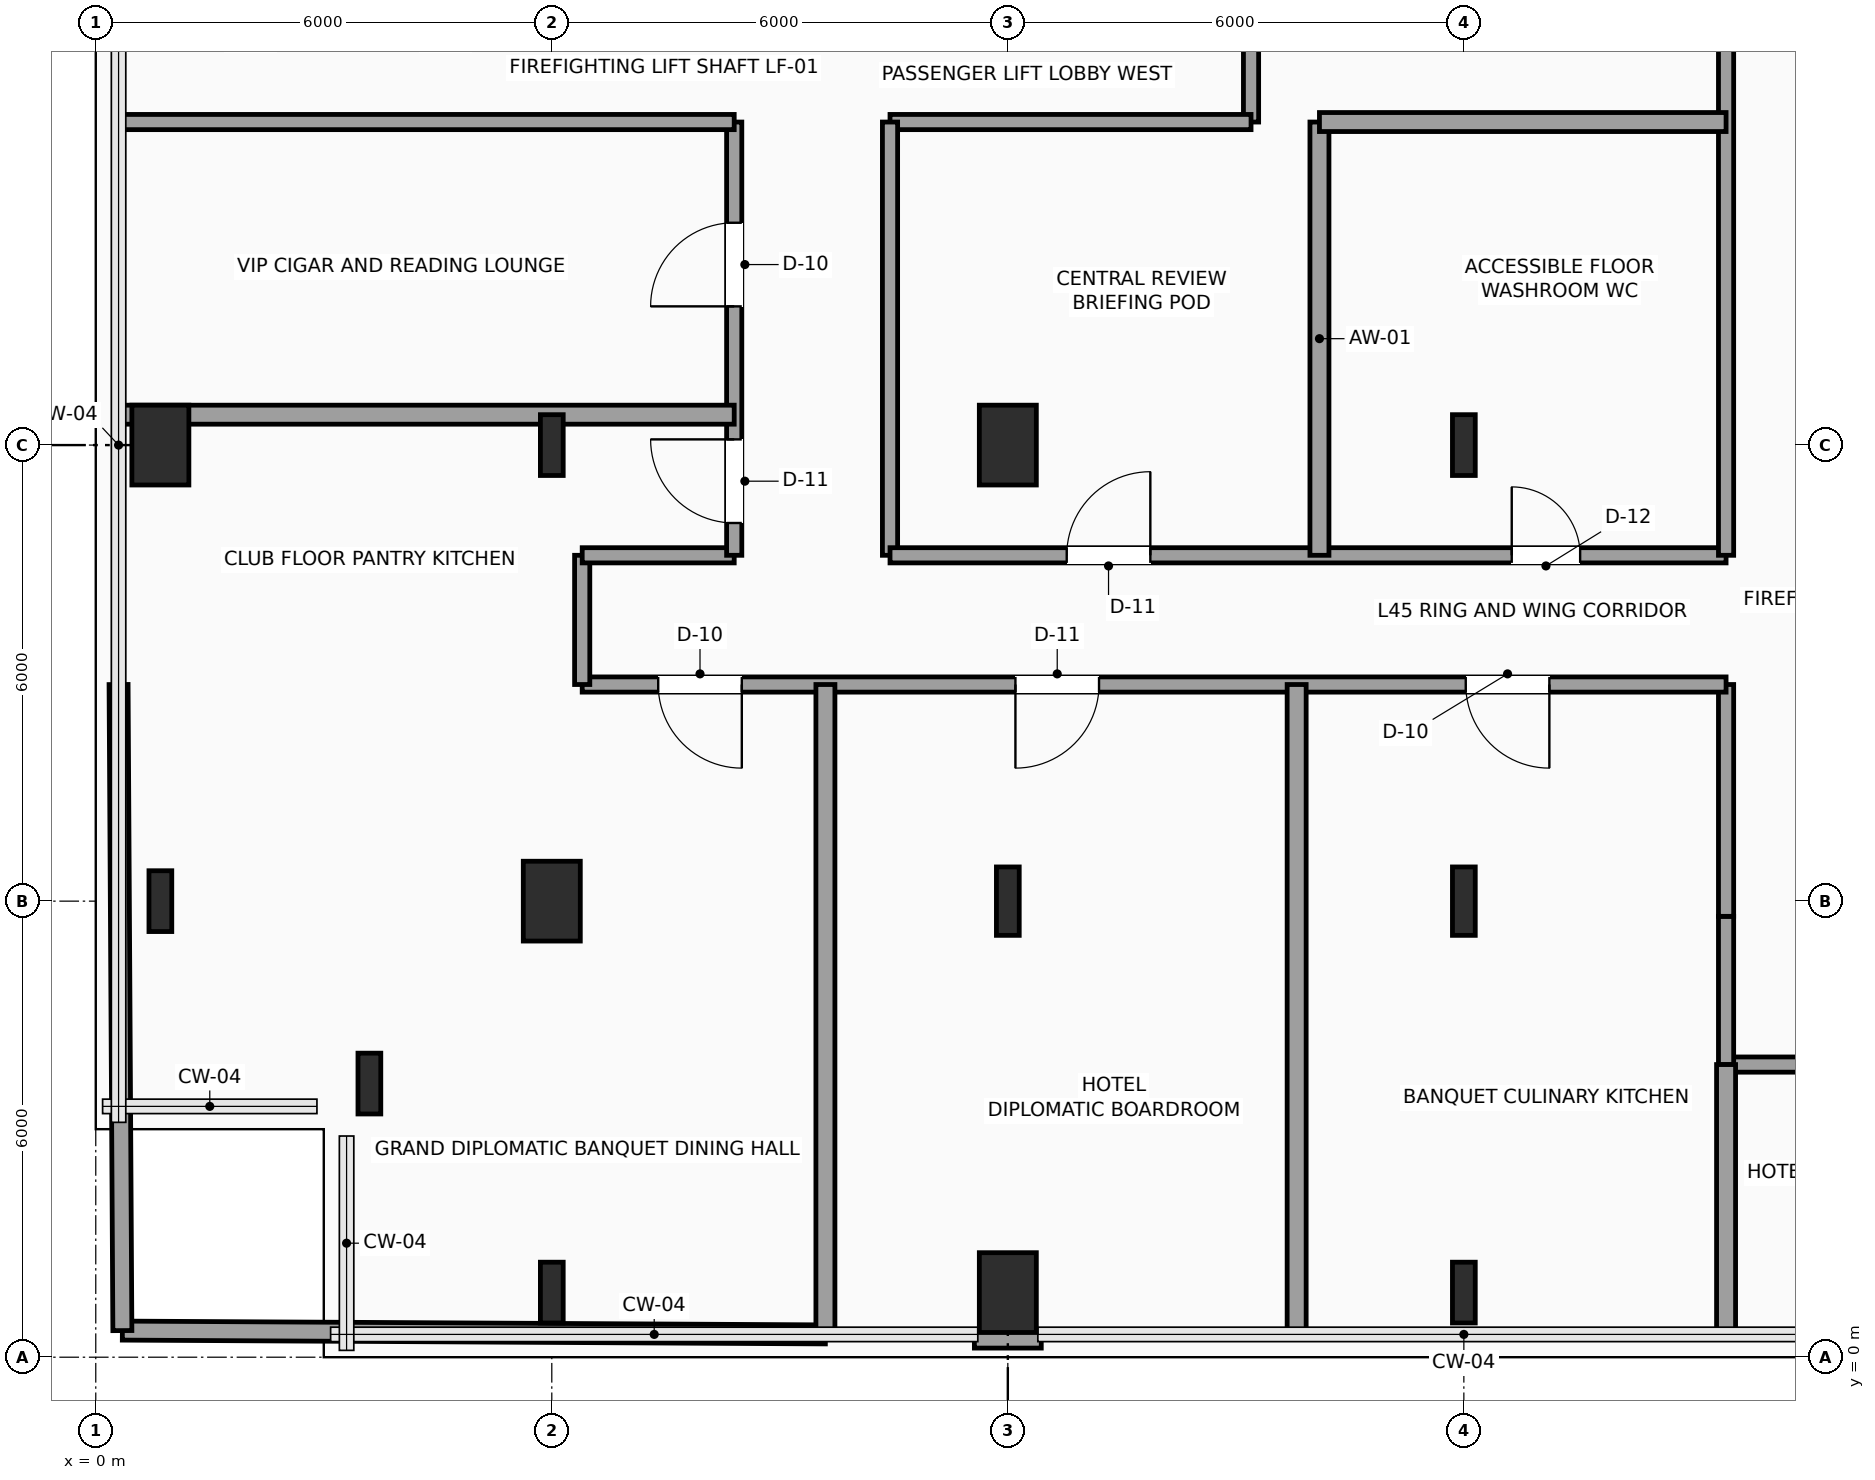
"""IFC4 building model, lengths in metres.
Left out: names, types, materials, properties, quantities, classifications, styles, units other than length and angle.
Written with IfcOpenShell. Run it as: python <this file> out.ifc"""

import sys

from ifc_helpers import new_model, si_unit, direction, frame, frame_2d, origin, origin_2d, place, context, subcontext, project, spatial, rectangle, i_section, extrude, element, fill, save


model = new_model("IFC4")
c1 = context("Model", 3, precision=1e-05, world=origin(), true_north=direction((0.0, 1.0)))
c2 = subcontext(c1, "Body", "Model", "MODEL_VIEW")
j1 = project(units=[si_unit("LENGTHUNIT", "METRE"), si_unit("PLANEANGLEUNIT", "RADIAN")], contexts=[c1])
p1 = place(None, origin())
s1 = spatial("IfcSite", under=j1, at=p1, CompositionType="ELEMENT")
p2 = place(p1, origin())
s2 = spatial("IfcBuilding", under=s1, at=p2, CompositionType="ELEMENT")
p3 = place(p2, frame((0.0, 0.0, 184.2)))
s3 = spatial("IfcBuildingStorey", under=s2, at=p3, CompositionType="ELEMENT", Elevation=184.2)
for number, where, z_axis, x_axis in (
    (1, (3.6, 3.6, 0.0), (0.0, 0.0, 1.0), (1.0, 0.0, 0.0)),
    (2, (0.85, 6.0, 0.0), (0.0, 0.0, 1.0), (1.0, 0.0, 0.0)),
):
    element("IfcColumn", number, at=place(p3, frame(where, z_axis=z_axis, x_axis=x_axis)), inside=s3, PredefinedType="COLUMN", context=c2, shape_type="SweptSolid", body=[
        extrude(i_section(OverallWidth=0.3, OverallDepth=0.8, WebThickness=0.018, FlangeThickness=0.033, FilletRadius=0.03, at=origin_2d()), origin(), (0.0, 0.0, 1.0), 3.75),
    ])
p4 = place(p3, frame((0.85, 12.0, 0.0), z_axis=(0.0, 0.0, 1.0), x_axis=(1.0, 0.0, 0.0)))
e3 = element("IfcColumn", 3, at=p4, inside=s3, PredefinedType="COLUMN", context=c2, shape_type="SweptSolid", body=[
    extrude(rectangle(XDim=0.75, YDim=1.05, at=origin_2d()), origin(), (0.0, 0.0, 1.0), 3.75),
])
p5 = place(p3, frame((6.0, 0.85, 0.0), z_axis=(0.0, 0.0, 1.0), x_axis=(1.0, 0.0, 0.0)))
e4 = element("IfcColumn", 4, at=p5, inside=s3, PredefinedType="COLUMN", context=c2, shape_type="SweptSolid", body=[
    extrude(i_section(OverallWidth=0.3, OverallDepth=0.8, WebThickness=0.018, FlangeThickness=0.033, FilletRadius=0.03, at=origin_2d()), origin(), (0.0, 0.0, 1.0), 3.75),
])
p6 = place(p3, frame((6.0, 6.0, 0.0), z_axis=(0.0, 0.0, 1.0), x_axis=(1.0, 0.0, 0.0)))
e5 = element("IfcColumn", 5, at=p6, inside=s3, PredefinedType="COLUMN", context=c2, shape_type="SweptSolid", body=[
    extrude(rectangle(XDim=0.75, YDim=1.05, at=origin_2d()), origin(), (0.0, 0.0, 1.0), 3.75),
])
p7 = place(p3, frame((6.0, 12.0, 0.0), z_axis=(0.0, 0.0, 1.0), x_axis=(1.0, 0.0, 0.0)))
e6 = element("IfcColumn", 6, at=p7, inside=s3, PredefinedType="COLUMN", context=c2, shape_type="SweptSolid", body=[
    extrude(i_section(OverallWidth=0.3, OverallDepth=0.8, WebThickness=0.018, FlangeThickness=0.033, FilletRadius=0.03, at=origin_2d()), origin(), (0.0, 0.0, 1.0), 3.75),
])
p8 = place(p3, frame((12.0, 0.85, 0.0), z_axis=(0.0, 0.0, 1.0), x_axis=(1.0, 0.0, 0.0)))
e7 = element("IfcColumn", 7, at=p8, inside=s3, PredefinedType="COLUMN", context=c2, shape_type="SweptSolid", body=[
    extrude(rectangle(XDim=0.75, YDim=1.05, at=origin_2d()), origin(), (0.0, 0.0, 1.0), 3.75),
])
p9 = place(p3, frame((12.0, 6.0, 0.0), z_axis=(0.0, 0.0, 1.0), x_axis=(1.0, 0.0, 0.0)))
e8 = element("IfcColumn", 8, at=p9, inside=s3, PredefinedType="COLUMN", context=c2, shape_type="SweptSolid", body=[
    extrude(i_section(OverallWidth=0.3, OverallDepth=0.9, WebThickness=0.019, FlangeThickness=0.035, FilletRadius=0.03, at=origin_2d()), origin(), (0.0, 0.0, 1.0), 3.75),
])
p10 = place(p3, frame((12.0, 12.0, 0.0), z_axis=(0.0, 0.0, 1.0), x_axis=(1.0, 0.0, 0.0)))
e9 = element("IfcColumn", 9, at=p10, inside=s3, PredefinedType="COLUMN", context=c2, shape_type="SweptSolid", body=[
    extrude(rectangle(XDim=0.75, YDim=1.05, at=origin_2d()), origin(), (0.0, 0.0, 1.0), 3.75),
])
p11 = place(p3, frame((18.0, 0.85, 0.0), z_axis=(0.0, 0.0, 1.0), x_axis=(1.0, 0.0, 0.0)))
e10 = element("IfcColumn", 10, at=p11, inside=s3, PredefinedType="COLUMN", context=c2, shape_type="SweptSolid", body=[
    extrude(i_section(OverallWidth=0.3, OverallDepth=0.8, WebThickness=0.018, FlangeThickness=0.033, FilletRadius=0.03, at=origin_2d()), origin(), (0.0, 0.0, 1.0), 3.75),
])
p12 = place(p3, frame((18.0, 6.0, 0.0), z_axis=(0.0, 0.0, 1.0), x_axis=(1.0, 0.0, 0.0)))
e11 = element("IfcColumn", 11, at=p12, inside=s3, PredefinedType="COLUMN", context=c2, shape_type="SweptSolid", body=[
    extrude(i_section(OverallWidth=0.3, OverallDepth=0.9, WebThickness=0.019, FlangeThickness=0.035, FilletRadius=0.03, at=origin_2d()), origin(), (0.0, 0.0, 1.0), 3.75),
])
p13 = place(p3, frame((18.0, 12.0, 0.0), z_axis=(0.0, 0.0, 1.0), x_axis=(1.0, 0.0, 0.0)))
e12 = element("IfcColumn", 12, at=p13, inside=s3, PredefinedType="COLUMN", context=c2, shape_type="SweptSolid", body=[
    extrude(i_section(OverallWidth=0.3, OverallDepth=0.8, WebThickness=0.018, FlangeThickness=0.033, FilletRadius=0.03, at=origin_2d()), origin(), (0.0, 0.0, 1.0), 3.75),
])
p14 = place(p3, frame((12.44, 0.24, 0.0), z_axis=(0.0, 0.0, 1.0), x_axis=(-1.0, 0.0, 0.0)))
e13 = element("IfcWall", 13, at=p14, inside=s3, PredefinedType="SOLIDWALL", context=c2, shape_type="SweptSolid", body=[
    extrude(rectangle(XDim=0.88, YDim=0.24, at=frame_2d((0.44, 0.0))), origin(), (0.0, 0.0, 1.0), 3.54),
])
p15 = place(p3, frame((23.95, 3.85, 0.0), z_axis=(0.0, 0.0, 1.0), x_axis=(-1.0, 0.0, 0.0)))
e14 = element("IfcWall", 14, at=p15, inside=s3, PredefinedType="SOLIDWALL", context=c2, shape_type="SweptSolid", body=[
    extrude(rectangle(XDim=2.5, YDim=0.2, at=frame_2d((1.25, 0.0))), origin(), (0.0, 0.0, 1.0), 3.54),
])
p16 = place(p3, frame((21.45, 3.85, 0.0), z_axis=(0.0, 0.0, 1.0), x_axis=(0.0, 1.0, 0.0)))
e15 = element("IfcWall", 15, at=p16, inside=s3, PredefinedType="SOLIDWALL", context=c2, shape_type="SweptSolid", body=[
    extrude(rectangle(XDim=1.95, YDim=0.2, at=frame_2d((0.975, 0.0))), origin(), (0.0, 0.0, 1.0), 3.54),
])
p17 = place(p3, frame((21.45, 5.8, 0.0), z_axis=(0.0, 0.0, 1.0), x_axis=(0.0, 1.0, 0.0)))
e16 = element("IfcWall", 16, at=p17, inside=s3, PredefinedType="SOLIDWALL", context=c2, shape_type="SweptSolid", body=[
    extrude(rectangle(XDim=3.05, YDim=0.2, at=frame_2d((1.525, 0.0))), origin(), (0.0, 0.0, 1.0), 3.54),
])
p18 = place(p3, frame((21.45, 8.85, 0.0), z_axis=(0.0, 0.0, 1.0), x_axis=(-1.0, 0.0, 0.0)))
e17 = element("IfcWall", 17, at=p18, inside=s3, PredefinedType="SOLIDWALL", context=c2, shape_type="SweptSolid", body=[
    extrude(rectangle(XDim=15.05, YDim=0.2, at=frame_2d((7.525, 0.0))), origin(), (0.0, 0.0, 1.0), 3.132),
])
p19 = place(p18, frame((12.95, 0.0, 0.0)))
e18 = element("IfcOpeningElement", 18, at=p19, cuts=e17, PredefinedType="OPENING", context=c2, shape_type="SweptSolid", body=[
    extrude(rectangle(XDim=1.1, YDim=2.25, at=frame_2d((0.55, 1.125))), frame((0.0, 0.11, 0.0), z_axis=(0.0, -1.0, 0.0), x_axis=(1.0, 0.0, 0.0)), (0.0, 0.0, 1.0), 0.22),
])
p20 = place(p18, frame((8.25, 0.0, 0.0)))
e19 = element("IfcOpeningElement", 19, at=p20, cuts=e17, PredefinedType="OPENING", context=c2, shape_type="SweptSolid", body=[
    extrude(rectangle(XDim=1.1, YDim=2.25, at=frame_2d((0.55, 1.125))), frame((0.0, 0.11, 0.0), z_axis=(0.0, -1.0, 0.0), x_axis=(1.0, 0.0, 0.0)), (0.0, 0.0, 1.0), 0.22),
])
p21 = place(p18, frame((2.325, 0.0, 0.0)))
e20 = element("IfcOpeningElement", 20, at=p21, cuts=e17, PredefinedType="OPENING", context=c2, shape_type="SweptSolid", body=[
    extrude(rectangle(XDim=1.1, YDim=2.25, at=frame_2d((0.55, 1.125))), frame((0.0, 0.11, 0.0), z_axis=(0.0, -1.0, 0.0), x_axis=(1.0, 0.0, 0.0)), (0.0, 0.0, 1.0), 0.22),
])
p22 = place(p3, frame((6.4, 8.85, 0.0), z_axis=(0.0, 0.0, 1.0), x_axis=(0.0, 1.0, 0.0)))
e21 = element("IfcWall", 21, at=p22, inside=s3, PredefinedType="SOLIDWALL", context=c2, shape_type="SweptSolid", body=[
    extrude(rectangle(XDim=1.7, YDim=0.2, at=frame_2d((0.85, 0.0))), origin(), (0.0, 0.0, 1.0), 3.54),
])
p23 = place(p3, frame((6.4, 10.55, 0.0), z_axis=(0.0, 0.0, 1.0), x_axis=(1.0, 0.0, 0.0)))
e22 = element("IfcWall", 22, at=p23, inside=s3, PredefinedType="SOLIDWALL", context=c2, shape_type="SweptSolid", body=[
    extrude(rectangle(XDim=2.0, YDim=0.2, at=frame_2d((1.0, 0.0))), origin(), (0.0, 0.0, 1.0), 3.54),
])
p24 = place(p3, frame((8.4, 10.55, 0.0), z_axis=(0.0, 0.0, 1.0), x_axis=(0.0, 1.0, 0.0)))
e23 = element("IfcWall", 23, at=p24, inside=s3, PredefinedType="SOLIDWALL", context=c2, shape_type="SweptSolid", body=[
    extrude(rectangle(XDim=5.7, YDim=0.2, at=frame_2d((2.85, 0.0))), origin(), (0.0, 0.0, 1.0), 3.54),
])
p25 = place(p24, frame((0.425, 0.0, 0.0)))
e24 = element("IfcOpeningElement", 24, at=p25, cuts=e23, PredefinedType="OPENING", context=c2, shape_type="SweptSolid", body=[
    extrude(rectangle(XDim=1.1, YDim=2.25, at=frame_2d((0.55, 1.125))), frame((0.0, 0.11, 0.0), z_axis=(0.0, -1.0, 0.0), x_axis=(1.0, 0.0, 0.0)), (0.0, 0.0, 1.0), 0.22),
])
p26 = place(p24, frame((3.275, 0.0, 0.0)))
e25 = element("IfcOpeningElement", 25, at=p26, cuts=e23, PredefinedType="OPENING", context=c2, shape_type="SweptSolid", body=[
    extrude(rectangle(XDim=1.1, YDim=2.25, at=frame_2d((0.55, 1.125))), frame((0.0, 0.11, 0.0), z_axis=(0.0, -1.0, 0.0), x_axis=(1.0, 0.0, 0.0)), (0.0, 0.0, 1.0), 0.22),
])
p27 = place(p3, frame((8.4, 16.25, 0.0), z_axis=(0.0, 0.0, 1.0), x_axis=(-1.0, 0.0, 0.0)))
e26 = element("IfcWall", 26, at=p27, inside=s3, PredefinedType="SOLIDWALL", context=c2, shape_type="SweptSolid", body=[
    extrude(rectangle(XDim=8.1, YDim=0.2, at=frame_2d((4.05, 0.0))), origin(), (0.0, 0.0, 1.0), 3.54),
])
p28 = place(p3, frame((15.2, 17.95, 0.0), z_axis=(0.0, 0.0, 1.0), x_axis=(0.0, -1.0, 0.0)))
e27 = element("IfcWall", 27, at=p28, inside=s3, PredefinedType="SOLIDWALL", context=c2, shape_type="SweptSolid", body=[
    extrude(rectangle(XDim=1.7, YDim=0.2, at=frame_2d((0.85, 0.0))), origin(), (0.0, 0.0, 1.0), 3.54),
])
p29 = place(p3, frame((15.2, 16.25, 0.0), z_axis=(0.0, 0.0, 1.0), x_axis=(-1.0, 0.0, 0.0)))
e28 = element("IfcWall", 28, at=p29, inside=s3, PredefinedType="SOLIDWALL", context=c2, shape_type="SweptSolid", body=[
    extrude(rectangle(XDim=4.75, YDim=0.2, at=frame_2d((2.375, 0.0))), origin(), (0.0, 0.0, 1.0), 3.54),
])
p30 = place(p3, frame((10.45, 16.25, 0.0), z_axis=(0.0, 0.0, 1.0), x_axis=(0.0, -1.0, 0.0)))
e29 = element("IfcWall", 29, at=p30, inside=s3, PredefinedType="SOLIDWALL", context=c2, shape_type="SweptSolid", body=[
    extrude(rectangle(XDim=5.7, YDim=0.2, at=frame_2d((2.85, 0.0))), origin(), (0.0, 0.0, 1.0), 3.54),
])
p31 = place(p3, frame((10.45, 10.55, 0.0), z_axis=(0.0, 0.0, 1.0), x_axis=(1.0, 0.0, 0.0)))
e30 = element("IfcWall", 30, at=p31, inside=s3, PredefinedType="SOLIDWALL", context=c2, shape_type="SweptSolid", body=[
    extrude(rectangle(XDim=11.0, YDim=0.2, at=frame_2d((5.5, 0.0))), origin(), (0.0, 0.0, 1.0), 3.54),
])
p32 = place(p31, frame((2.325, 0.0, 0.0)))
e31 = element("IfcOpeningElement", 31, at=p32, cuts=e30, PredefinedType="OPENING", context=c2, shape_type="SweptSolid", body=[
    extrude(rectangle(XDim=1.1, YDim=2.25, at=frame_2d((0.55, 1.125))), frame((0.0, 0.11, 0.0), z_axis=(0.0, -1.0, 0.0), x_axis=(1.0, 0.0, 0.0)), (0.0, 0.0, 1.0), 0.22),
])
p33 = place(p31, frame((8.18, 0.0, 0.0)))
e32 = element("IfcOpeningElement", 32, at=p33, cuts=e30, PredefinedType="OPENING", context=c2, shape_type="SweptSolid", body=[
    extrude(rectangle(XDim=0.9, YDim=2.1, at=frame_2d((0.45, 1.05))), frame((0.0, 0.11, 0.0), z_axis=(0.0, -1.0, 0.0), x_axis=(1.0, 0.0, 0.0)), (0.0, 0.0, 1.0), 0.22),
])
p34 = place(p3, frame((21.45, 10.55, 0.0), z_axis=(0.0, 0.0, 1.0), x_axis=(0.0, 1.0, 0.0)))
e33 = element("IfcWall", 33, at=p34, inside=s3, PredefinedType="SOLIDWALL", context=c2, shape_type="SweptSolid", body=[
    extrude(rectangle(XDim=19.7, YDim=0.2, at=frame_2d((9.85, 0.0))), origin(), (0.0, 0.0, 1.0), 3.54),
])
p35 = place(p34, frame((9.4, 0.0, 0.0)))
e34 = element("IfcOpeningElement", 34, at=p35, cuts=e33, PredefinedType="OPENING", context=c2, shape_type="SweptSolid", body=[
    extrude(rectangle(XDim=0.95, YDim=2.15, at=frame_2d((0.475, 1.075))), frame((0.0, 0.11, 0.0), z_axis=(0.0, -1.0, 0.0), x_axis=(1.0, 0.0, 0.0)), (0.0, 0.0, 1.0), 0.22),
])
p36 = place(p34, frame((14.175, 0.0, 0.0)))
e35 = element("IfcOpeningElement", 35, at=p36, cuts=e33, PredefinedType="OPENING", context=c2, shape_type="SweptSolid", body=[
    extrude(rectangle(XDim=0.9, YDim=2.1, at=frame_2d((0.45, 1.05))), frame((0.0, 0.11, 0.0), z_axis=(0.0, -1.0, 0.0), x_axis=(1.0, 0.0, 0.0)), (0.0, 0.0, 1.0), 0.22),
])
p37 = place(p3, frame((16.1, 10.55, 0.0), z_axis=(0.0, 0.0, 1.0), x_axis=(0.0, 1.0, 0.0)))
e36 = element("IfcWall", 36, at=p37, inside=s3, PredefinedType="PARTITIONING", context=c2, shape_type="SweptSolid", body=[
    extrude(rectangle(XDim=5.7, YDim=0.25, at=frame_2d((2.85, 0.0))), origin(), (0.0, 0.0, 1.0), 3.54),
])
p38 = place(p3, frame((16.1, 16.25, 0.0), z_axis=(0.0, 0.0, 1.0), x_axis=(1.0, 0.0, 0.0)))
e37 = element("IfcWall", 37, at=p38, inside=s3, PredefinedType="PARTITIONING", context=c2, shape_type="SweptSolid", body=[
    extrude(rectangle(XDim=5.35, YDim=0.25, at=frame_2d((2.675, 0.0))), origin(), (0.0, 0.0, 1.0), 3.54),
])
p39 = place(p3, frame((21.45, 0.3, 0.0), z_axis=(0.0, 0.0, 1.0), x_axis=(0.0, 1.0, 0.0)))
e38 = element("IfcWall", 38, at=p39, inside=s3, PredefinedType="PARTITIONING", context=c2, shape_type="SweptSolid", body=[
    extrude(rectangle(XDim=3.55, YDim=0.25, at=frame_2d((1.775, 0.0))), origin(), (0.0, 0.0, 1.0), 3.54),
])
p40 = place(p3, frame((0.35, 0.35, 0.0), z_axis=(0.0, 0.0, 1.0), x_axis=(0.99998536257, -0.005410604923, 0.0)))
e39 = element("IfcWall", 39, at=p40, inside=s3, PredefinedType="PARTITIONING", context=c2, shape_type="SweptSolid", body=[
    extrude(rectangle(XDim=9.25, YDim=0.25, at=frame_2d((4.625, 0.0))), origin(), (0.0, 0.0, 1.0), 3.54),
])
p41 = place(p3, frame((0.35, 0.35, 0.0), z_axis=(0.0, 0.0, 1.0), x_axis=(-0.00588799536, 0.999982665605, 0.0)))
e40 = element("IfcWall", 40, at=p41, inside=s3, PredefinedType="PARTITIONING", context=c2, shape_type="SweptSolid", body=[
    extrude(rectangle(XDim=8.5, YDim=0.25, at=frame_2d((4.25, 0.0))), origin(), (0.0, 0.0, 1.0), 3.54),
])
for number, where, z_axis, x_axis in (
    (41, (9.6, 0.3, 0.0), (0.0, 0.0, 1.0), (0.0, 1.0, 0.0)),
    (42, (15.8, 0.3, 0.0), (0.0, 0.0, 1.0), (0.0, 1.0, 0.0)),
):
    element("IfcWall", number, at=place(p3, frame(where, z_axis=z_axis, x_axis=x_axis)), inside=s3, PredefinedType="PARTITIONING", context=c2, shape_type="SweptSolid", body=[
        extrude(rectangle(XDim=8.55, YDim=0.25, at=frame_2d((4.275, 0.0))), origin(), (0.0, 0.0, 1.0), 3.54),
    ])
p42 = place(p3, frame((0.3, 12.4, 0.0), z_axis=(0.0, 0.0, 1.0), x_axis=(1.0, 0.0, 0.0)))
e43 = element("IfcWall", 43, at=p42, inside=s3, PredefinedType="PARTITIONING", context=c2, shape_type="SweptSolid", body=[
    extrude(rectangle(XDim=8.1, YDim=0.25, at=frame_2d((4.05, 0.0))), origin(), (0.0, 0.0, 1.0), 3.54),
])
p43 = place(p19, origin())
e44 = element("IfcDoor", 44, at=p43, inside=s3, OperationType="SINGLE_SWING_LEFT", PredefinedType="DOOR", context=c2, shape_type="SweptSolid", body=[
    extrude(rectangle(XDim=1.1, YDim=2.25, at=frame_2d((0.55, 1.125))), frame((0.0, 0.025, 0.0), z_axis=(0.0, -1.0, 0.0), x_axis=(1.0, 0.0, 0.0)), (0.0, 0.0, 1.0), 0.05),
])
fill(e18, e44)
p44 = place(p20, origin())
e45 = element("IfcDoor", 45, at=p44, inside=s3, OperationType="SINGLE_SWING_RIGHT", PredefinedType="DOOR", context=c2, shape_type="SweptSolid", body=[
    extrude(rectangle(XDim=1.1, YDim=2.25, at=frame_2d((0.55, 1.125))), frame((0.0, 0.025, 0.0), z_axis=(0.0, -1.0, 0.0), x_axis=(1.0, 0.0, 0.0)), (0.0, 0.0, 1.0), 0.05),
])
fill(e19, e45)
p45 = place(p21, origin())
e46 = element("IfcDoor", 46, at=p45, inside=s3, OperationType="SINGLE_SWING_LEFT", PredefinedType="DOOR", context=c2, shape_type="SweptSolid", body=[
    extrude(rectangle(XDim=1.1, YDim=2.25, at=frame_2d((0.55, 1.125))), frame((0.0, 0.025, 0.0), z_axis=(0.0, -1.0, 0.0), x_axis=(1.0, 0.0, 0.0)), (0.0, 0.0, 1.0), 0.05),
])
fill(e20, e46)
p46 = place(p25, origin())
e47 = element("IfcDoor", 47, at=p46, inside=s3, OperationType="SINGLE_SWING_RIGHT", PredefinedType="DOOR", context=c2, shape_type="SweptSolid", body=[
    extrude(rectangle(XDim=1.1, YDim=2.25, at=frame_2d((0.55, 1.125))), frame((0.0, 0.025, 0.0), z_axis=(0.0, -1.0, 0.0), x_axis=(1.0, 0.0, 0.0)), (0.0, 0.0, 1.0), 0.05),
])
fill(e24, e47)
p47 = place(p26, origin())
e48 = element("IfcDoor", 48, at=p47, inside=s3, OperationType="SINGLE_SWING_LEFT", PredefinedType="DOOR", context=c2, shape_type="SweptSolid", body=[
    extrude(rectangle(XDim=1.1, YDim=2.25, at=frame_2d((0.55, 1.125))), frame((0.0, 0.025, 0.0), z_axis=(0.0, -1.0, 0.0), x_axis=(1.0, 0.0, 0.0)), (0.0, 0.0, 1.0), 0.05),
])
fill(e25, e48)
p48 = place(p32, origin())
e49 = element("IfcDoor", 49, at=p48, inside=s3, OperationType="SINGLE_SWING_RIGHT", PredefinedType="DOOR", context=c2, shape_type="SweptSolid", body=[
    extrude(rectangle(XDim=1.1, YDim=2.25, at=frame_2d((0.55, 1.125))), frame((0.0, 0.025, 0.0), z_axis=(0.0, -1.0, 0.0), x_axis=(1.0, 0.0, 0.0)), (0.0, 0.0, 1.0), 0.05),
])
fill(e31, e49)
p49 = place(p33, origin())
e50 = element("IfcDoor", 50, at=p49, inside=s3, OperationType="SINGLE_SWING_LEFT", PredefinedType="DOOR", context=c2, shape_type="SweptSolid", body=[
    extrude(rectangle(XDim=0.9, YDim=2.1, at=frame_2d((0.45, 1.05))), frame((0.0, 0.025, 0.0), z_axis=(0.0, -1.0, 0.0), x_axis=(1.0, 0.0, 0.0)), (0.0, 0.0, 1.0), 0.05),
])
fill(e32, e50)
save(model, sys.argv[1])
